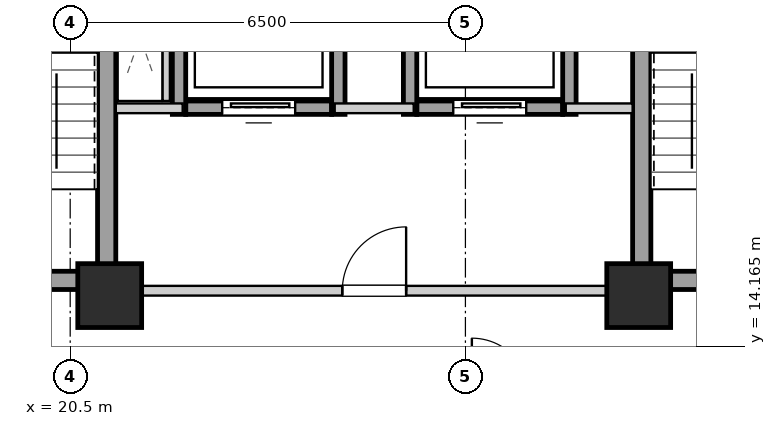
"""IFC4 building model, lengths in metres.
Left out: names, types, materials, properties, quantities, classifications, styles, units other than length and angle.
Written with IfcOpenShell. Run it as: python <this file> out.ifc"""

import sys

from ifc_helpers import new_model, si_unit, direction, frame, frame_2d, origin, origin_2d, place, context, subcontext, project, spatial, rectangle, extrude, element, fill, save


model = new_model("IFC4")
c1 = context("Model", 3, precision=1e-05, world=origin(), true_north=direction((0.0, 1.0)))
c2 = subcontext(c1, "Body", "Model", "MODEL_VIEW")
j1 = project(units=[si_unit("LENGTHUNIT", "METRE"), si_unit("PLANEANGLEUNIT", "RADIAN")], contexts=[c1])
p1 = place(None, origin())
s1 = spatial("IfcSite", under=j1, at=p1, CompositionType="ELEMENT")
p2 = place(p1, origin())
s2 = spatial("IfcBuilding", under=s1, at=p2, CompositionType="ELEMENT")
p3 = place(p2, frame((0.0, 0.0, 87.9)))
s3 = spatial("IfcBuildingStorey", under=s2, at=p3, CompositionType="ELEMENT", Elevation=87.9)
for number, where, z_axis, x_axis in (
    (1, (21.15, 15.0, 0.0), (0.0, 0.0, 1.0), (1.0, 0.0, 0.0)),
    (2, (29.85, 15.0, 0.0), (0.0, 0.0, 1.0), (1.0, 0.0, 0.0)),
):
    element("IfcColumn", number, at=place(p3, frame(where, z_axis=z_axis, x_axis=x_axis)), inside=s3, PredefinedType="COLUMN", context=c2, shape_type="SweptSolid", body=[
        extrude(rectangle(XDim=1.05, YDim=1.05, at=origin_2d()), origin(), (0.0, 0.0, 1.0), 3.2),
    ])
p4 = place(p3, frame((21.1, 15.1, 0.0), z_axis=(0.0, 0.0, 1.0), x_axis=(0.0, 1.0, 0.0)))
e3 = element("IfcWall", 3, at=p4, inside=s3, PredefinedType="SHEAR", context=c2, shape_type="SweptSolid", body=[
    extrude(rectangle(XDim=9.0, YDim=0.3, at=frame_2d((4.5, 0.0))), origin(), (0.0, 0.0, 1.0), 2.94),
])
p5 = place(p3, frame((18.1, 15.25, 0.0), z_axis=(0.0, 0.0, 1.0), x_axis=(1.0, 0.0, 0.0)))
e4 = element("IfcWall", 4, at=p5, inside=s3, PredefinedType="SHEAR", context=c2, shape_type="SweptSolid", body=[
    extrude(rectangle(XDim=2.85, YDim=0.3, at=frame_2d((1.425, 0.0))), origin(), (0.0, 0.0, 1.0), 2.94),
])
p6 = place(p5, frame((0.86, 0.0, 0.0)))
e5 = element("IfcOpeningElement", 5, at=p6, cuts=e4, PredefinedType="OPENING", context=c2, shape_type="SweptSolid", body=[
    extrude(rectangle(XDim=1.1, YDim=2.05, at=frame_2d((0.55, 1.025))), frame((0.0, 0.16, 0.0), z_axis=(0.0, -1.0, 0.0), x_axis=(1.0, 0.0, 0.0)), (0.0, 0.0, 1.0), 0.32),
])
p7 = place(p3, frame((29.9, 15.1, 0.0), z_axis=(0.0, 0.0, 1.0), x_axis=(0.0, 1.0, 0.0)))
e6 = element("IfcWall", 6, at=p7, inside=s3, PredefinedType="SHEAR", context=c2, shape_type="SweptSolid", body=[
    extrude(rectangle(XDim=9.0, YDim=0.3, at=frame_2d((4.5, 0.0))), origin(), (0.0, 0.0, 1.0), 2.94),
])
p8 = place(p3, frame((30.05, 15.25, 0.0), z_axis=(0.0, 0.0, 1.0), x_axis=(1.0, 0.0, 0.0)))
e7 = element("IfcWall", 7, at=p8, inside=s3, PredefinedType="SHEAR", context=c2, shape_type="SweptSolid", body=[
    extrude(rectangle(XDim=2.85, YDim=0.3, at=frame_2d((1.425, 0.0))), origin(), (0.0, 0.0, 1.0), 2.94),
])
p9 = place(p8, frame((0.86, 0.0, 0.0)))
e8 = element("IfcOpeningElement", 8, at=p9, cuts=e7, PredefinedType="OPENING", context=c2, shape_type="SweptSolid", body=[
    extrude(rectangle(XDim=1.1, YDim=2.05, at=frame_2d((0.55, 1.025))), frame((0.0, 0.16, 0.0), z_axis=(0.0, -1.0, 0.0), x_axis=(1.0, 0.0, 0.0)), (0.0, 0.0, 1.0), 0.32),
])
p10 = place(p3, frame((22.4, 18.09, 0.0), z_axis=(0.0, 0.0, 1.0), x_axis=(1.0, 0.0, 0.0)))
e9 = element("IfcWall", 9, at=p10, inside=s3, PredefinedType="SHEAR", context=c2, shape_type="SweptSolid", body=[
    extrude(rectangle(XDim=2.4, YDim=0.22, at=frame_2d((1.2, 0.0))), origin(), (0.0, 0.0, 1.0), 2.94),
])
p11 = place(p10, frame((0.6, 0.0, 0.0)))
e10 = element("IfcOpeningElement", 10, at=p11, cuts=e9, PredefinedType="OPENING", context=c2, shape_type="SweptSolid", body=[
    extrude(rectangle(XDim=1.2, YDim=2.15, at=frame_2d((0.6, 1.075))), frame((0.0, 0.12, 0.0), z_axis=(0.0, -1.0, 0.0), x_axis=(1.0, 0.0, 0.0)), (0.0, 0.0, 1.0), 0.24),
])
for number, where, z_axis, x_axis in (
    (11, (22.29, 17.98, 0.0), (0.0, 0.0, 1.0), (0.0, 1.0, 0.0)),
    (12, (24.91, 17.98, 0.0), (0.0, 0.0, 1.0), (0.0, 1.0, 0.0)),
):
    element("IfcWall", number, at=place(p3, frame(where, z_axis=z_axis, x_axis=x_axis)), inside=s3, PredefinedType="SHEAR", context=c2, shape_type="SweptSolid", body=[
        extrude(rectangle(XDim=2.54, YDim=0.22, at=frame_2d((1.27, 0.0))), origin(), (0.0, 0.0, 1.0), 2.94),
    ])
p12 = place(p3, frame((26.2, 18.09, 0.0), z_axis=(0.0, 0.0, 1.0), x_axis=(1.0, 0.0, 0.0)))
e13 = element("IfcWall", 13, at=p12, inside=s3, PredefinedType="SHEAR", context=c2, shape_type="SweptSolid", body=[
    extrude(rectangle(XDim=2.4, YDim=0.22, at=frame_2d((1.2, 0.0))), origin(), (0.0, 0.0, 1.0), 2.94),
])
p13 = place(p12, frame((0.6, 0.0, 0.0)))
e14 = element("IfcOpeningElement", 14, at=p13, cuts=e13, PredefinedType="OPENING", context=c2, shape_type="SweptSolid", body=[
    extrude(rectangle(XDim=1.2, YDim=2.15, at=frame_2d((0.6, 1.075))), frame((0.0, 0.12, 0.0), z_axis=(0.0, -1.0, 0.0), x_axis=(1.0, 0.0, 0.0)), (0.0, 0.0, 1.0), 0.24),
])
for number, where, z_axis, x_axis in (
    (15, (26.09, 17.98, 0.0), (0.0, 0.0, 1.0), (0.0, 1.0, 0.0)),
    (16, (28.71, 17.98, 0.0), (0.0, 0.0, 1.0), (0.0, 1.0, 0.0)),
):
    element("IfcWall", number, at=place(p3, frame(where, z_axis=z_axis, x_axis=x_axis)), inside=s3, PredefinedType="SHEAR", context=c2, shape_type="SweptSolid", body=[
        extrude(rectangle(XDim=2.54, YDim=0.22, at=frame_2d((1.27, 0.0))), origin(), (0.0, 0.0, 1.0), 2.94),
    ])
p14 = place(p3, frame((21.25, 15.08, 0.0), z_axis=(0.0, 0.0, 1.0), x_axis=(1.0, 0.0, 0.0)))
e17 = element("IfcWall", 17, at=p14, inside=s3, PredefinedType="PARTITIONING", context=c2, shape_type="SweptSolid", body=[
    extrude(rectangle(XDim=8.5, YDim=0.16, at=frame_2d((4.25, 0.0))), origin(), (0.0, 0.0, 1.0), 2.309),
])
p15 = place(p14, frame((3.725, 0.0, 0.0)))
e18 = element("IfcOpeningElement", 18, at=p15, cuts=e17, PredefinedType="OPENING", context=c2, shape_type="SweptSolid", body=[
    extrude(rectangle(XDim=1.05, YDim=2.05, at=frame_2d((0.525, 1.025))), frame((0.0, 0.09, 0.0), z_axis=(0.0, -1.0, 0.0), x_axis=(1.0, 0.0, 0.0)), (0.0, 0.0, 1.0), 0.18),
])
p16 = place(p3, frame((21.25, 18.08, 0.0), z_axis=(0.0, 0.0, 1.0), x_axis=(1.0, 0.0, 0.0)))
e19 = element("IfcWall", 19, at=p16, inside=s3, PredefinedType="PARTITIONING", context=c2, shape_type="SweptSolid", body=[
    extrude(rectangle(XDim=1.1, YDim=0.16, at=frame_2d((0.55, 0.0))), origin(), (0.0, 0.0, 1.0), 2.94),
])
p17 = place(p3, frame((24.85, 18.08, 0.0), z_axis=(0.0, 0.0, 1.0), x_axis=(1.0, 0.0, 0.0)))
e20 = element("IfcWall", 20, at=p17, inside=s3, PredefinedType="PARTITIONING", context=c2, shape_type="SweptSolid", body=[
    extrude(rectangle(XDim=1.3, YDim=0.16, at=frame_2d((0.65, 0.0))), origin(), (0.0, 0.0, 1.0), 2.94),
])
p18 = place(p3, frame((28.65, 18.08, 0.0), z_axis=(0.0, 0.0, 1.0), x_axis=(1.0, 0.0, 0.0)))
e21 = element("IfcWall", 21, at=p18, inside=s3, PredefinedType="PARTITIONING", context=c2, shape_type="SweptSolid", body=[
    extrude(rectangle(XDim=1.1, YDim=0.16, at=frame_2d((0.55, 0.0))), origin(), (0.0, 0.0, 1.0), 2.94),
])
p19 = place(p3, frame((22.08, 18.2, 0.0), z_axis=(0.0, 0.0, 1.0), x_axis=(0.0, 1.0, 0.0)))
e22 = element("IfcWall", 22, at=p19, inside=s3, PredefinedType="PARTITIONING", context=c2, shape_type="SweptSolid", body=[
    extrude(rectangle(XDim=2.12, YDim=0.12, at=frame_2d((1.06, 0.0))), origin(), (0.0, 0.0, 1.0), 2.94),
])
p20 = place(p11, origin())
e23 = element("IfcDoor", 23, at=p20, inside=s3, OperationType="SLIDING_TO_LEFT", PredefinedType="DOOR", context=c2, shape_type="SweptSolid", body=[
    extrude(rectangle(XDim=1.2, YDim=2.15, at=frame_2d((0.6, 1.075))), frame((0.0, 0.025, 0.0), z_axis=(0.0, -1.0, 0.0), x_axis=(1.0, 0.0, 0.0)), (0.0, 0.0, 1.0), 0.05),
])
fill(e10, e23)
p21 = place(p13, origin())
e24 = element("IfcDoor", 24, at=p21, inside=s3, OperationType="SLIDING_TO_LEFT", PredefinedType="DOOR", context=c2, shape_type="SweptSolid", body=[
    extrude(rectangle(XDim=1.2, YDim=2.15, at=frame_2d((0.6, 1.075))), frame((0.0, 0.025, 0.0), z_axis=(0.0, -1.0, 0.0), x_axis=(1.0, 0.0, 0.0)), (0.0, 0.0, 1.0), 0.05),
])
fill(e14, e24)
p22 = place(p15, origin())
e25 = element("IfcDoor", 25, at=p22, inside=s3, OperationType="SINGLE_SWING_RIGHT", PredefinedType="DOOR", context=c2, shape_type="SweptSolid", body=[
    extrude(rectangle(XDim=1.05, YDim=2.05, at=frame_2d((0.525, 1.025))), frame((0.0, 0.025, 0.0), z_axis=(0.0, -1.0, 0.0), x_axis=(1.0, 0.0, 0.0)), (0.0, 0.0, 1.0), 0.05),
])
fill(e18, e25)
save(model, sys.argv[1])
